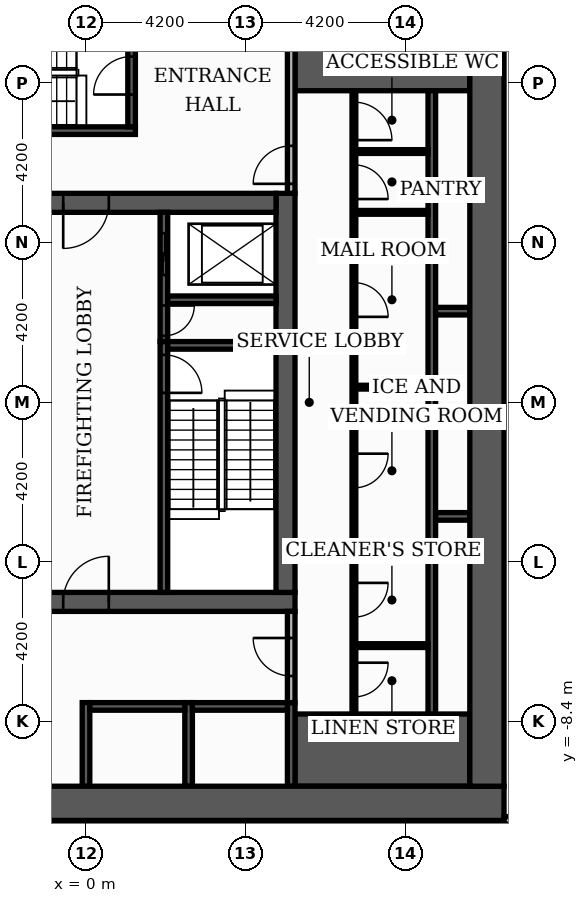
"""IFC4 building model, lengths in metres.
Left out: names, types, materials, properties, quantities, classifications, styles, units other than length and angle.
Written with IfcOpenShell. Run it as: python <this file> out.ifc"""

import sys

from ifc_helpers import new_model, si_unit, direction, frame, frame_2d, origin, place, context, subcontext, project, spatial, rectangle, extrude, element, fill, save


model = new_model("IFC4")
c1 = context("Model", 3, precision=1e-05, world=origin(), true_north=direction((0.0, 1.0)))
c2 = subcontext(c1, "Body", "Model", "MODEL_VIEW")
j1 = project(units=[si_unit("LENGTHUNIT", "METRE"), si_unit("PLANEANGLEUNIT", "RADIAN")], contexts=[c1])
p1 = place(None, origin())
s1 = spatial("IfcSite", under=j1, at=p1, CompositionType="ELEMENT")
p2 = place(p1, origin())
s2 = spatial("IfcBuilding", under=s1, at=p2, CompositionType="ELEMENT")
p3 = place(p2, frame((0.0, 0.0, -4.2)))
s3 = spatial("IfcBuildingStorey", under=s2, at=p3, CompositionType="ELEMENT", Elevation=-4.2)
p4 = place(p3, frame((-5.5, -5.25, 0.0), z_axis=(0.0, 0.0, 1.0), x_axis=(1.0, 0.0, 0.0)))
e1 = element("IfcWall", 1, at=p4, inside=s3, PredefinedType="SHEAR", context=c2, shape_type="SweptSolid", body=[
    extrude(rectangle(XDim=11.0, YDim=0.5, at=frame_2d((5.5, 0.0))), origin(), (0.0, 0.0, 1.0), 3.78),
])
p5 = place(p4, frame((4.9, 0.0, 0.0)))
e2 = element("IfcOpeningElement", 2, at=p5, cuts=e1, PredefinedType="OPENING", context=c2, shape_type="SweptSolid", body=[
    extrude(rectangle(XDim=1.2, YDim=2.1, at=frame_2d((0.6, 1.05))), frame((0.0, 0.26, 0.0), z_axis=(0.0, -1.0, 0.0), x_axis=(1.0, 0.0, 0.0)), (0.0, 0.0, 1.0), 0.52),
])
p6 = place(p3, frame((5.25, -5.0, 0.0), z_axis=(0.0, 0.0, 1.0), x_axis=(0.0, 1.0, 0.0)))
e3 = element("IfcWall", 3, at=p6, inside=s3, PredefinedType="SHEAR", context=c2, shape_type="SweptSolid", body=[
    extrude(rectangle(XDim=10.5, YDim=0.5, at=frame_2d((5.25, 0.0))), origin(), (0.0, 0.0, 1.0), 3.78),
])
p7 = place(p3, frame((-5.0, 5.25, 0.0), z_axis=(0.0, 0.0, 1.0), x_axis=(1.0, 0.0, 0.0)))
e4 = element("IfcWall", 4, at=p7, inside=s3, PredefinedType="SHEAR", context=c2, shape_type="SweptSolid", body=[
    extrude(rectangle(XDim=10.0, YDim=0.5, at=frame_2d((5.0, 0.0))), origin(), (0.0, 0.0, 1.0), 3.78),
])
p8 = place(p7, frame((4.4, 0.0, 0.0)))
e5 = element("IfcOpeningElement", 5, at=p8, cuts=e4, PredefinedType="OPENING", context=c2, shape_type="SweptSolid", body=[
    extrude(rectangle(XDim=1.2, YDim=2.1, at=frame_2d((0.6, 1.05))), frame((0.0, 0.26, 0.0), z_axis=(0.0, -1.0, 0.0), x_axis=(1.0, 0.0, 0.0)), (0.0, 0.0, 1.0), 0.52),
])
for number, where, z_axis, x_axis in (
    (6, (5.5, -9.15, 0.0), (0.0, 0.0, 1.0), (1.0, 0.0, 0.0)),
    (7, (5.5, 9.15, 0.0), (0.0, 0.0, 1.0), (1.0, 0.0, 0.0)),
):
    element("IfcWall", number, at=place(p3, frame(where, z_axis=z_axis, x_axis=x_axis)), inside=s3, PredefinedType="SHEAR", context=c2, shape_type="SweptSolid", body=[
        extrude(rectangle(XDim=4.6, YDim=1.9, at=frame_2d((2.3, 0.0))), origin(), (0.0, 0.0, 1.0), 3.78),
    ])
p9 = place(p3, frame((2.05, -5.0, 0.0), z_axis=(0.0, 0.0, 1.0), x_axis=(0.0, 1.0, 0.0)))
e8 = element("IfcWall", 8, at=p9, inside=s3, PredefinedType="SHEAR", context=c2, shape_type="SweptSolid", body=[
    extrude(rectangle(XDim=6.6, YDim=0.2, at=frame_2d((3.3, 0.0))), origin(), (0.0, 0.0, 1.0), 3.78),
])
p10 = place(p9, frame((5.25, 0.0, 0.0)))
e9 = element("IfcOpeningElement", 9, at=p10, cuts=e8, PredefinedType="OPENING", context=c2, shape_type="SweptSolid", body=[
    extrude(rectangle(XDim=1.0, YDim=2.1, at=frame_2d((0.5, 1.05))), frame((0.0, 0.11, 0.0), z_axis=(0.0, -1.0, 0.0), x_axis=(1.0, 0.0, 0.0)), (0.0, 0.0, 1.0), 0.22),
])
p11 = place(p3, frame((2.15, 1.5, 0.0), z_axis=(0.0, 0.0, 1.0), x_axis=(1.0, 0.0, 0.0)))
e10 = element("IfcWall", 10, at=p11, inside=s3, PredefinedType="SHEAR", context=c2, shape_type="SweptSolid", body=[
    extrude(rectangle(XDim=2.85, YDim=0.2, at=frame_2d((1.425, 0.0))), origin(), (0.0, 0.0, 1.0), 3.78),
])
p12 = place(p3, frame((-5.5, 7.15, 0.0), z_axis=(0.0, 0.0, 1.0), x_axis=(1.0, 0.0, 0.0)))
e11 = element("IfcWall", 11, at=p12, inside=s3, PredefinedType="SHEAR", context=c2, shape_type="SweptSolid", body=[
    extrude(rectangle(XDim=6.8, YDim=0.2, at=frame_2d((3.4, 0.0))), origin(), (0.0, 0.0, 1.0), 3.78),
])
p13 = place(p3, frame((1.2, 7.25, 0.0), z_axis=(0.0, 0.0, 1.0), x_axis=(0.0, 1.0, 0.0)))
e12 = element("IfcWall", 12, at=p13, inside=s3, PredefinedType="SHEAR", context=c2, shape_type="SweptSolid", body=[
    extrude(rectangle(XDim=2.85, YDim=0.2, at=frame_2d((1.425, 0.0))), origin(), (0.0, 0.0, 1.0), 3.78),
])
p14 = place(p13, frame((0.85, 0.0, 0.0)))
e13 = element("IfcOpeningElement", 13, at=p14, cuts=e12, PredefinedType="OPENING", context=c2, shape_type="SweptSolid", body=[
    extrude(rectangle(XDim=1.0, YDim=2.1, at=frame_2d((0.5, 1.05))), frame((0.0, 0.11, 0.0), z_axis=(0.0, -1.0, 0.0), x_axis=(1.0, 0.0, 0.0)), (0.0, 0.0, 1.0), 0.22),
])
for number, where, z_axis, x_axis in (
    (14, (0.0, -10.1, 0.0), (0.0, 0.0, 1.0), (0.0, 1.0, 0.0)),
    (15, (2.7, -10.1, 0.0), (0.0, 0.0, 1.0), (0.0, 1.0, 0.0)),
    (16, (5.4, -10.1, 0.0), (0.0, 0.0, 1.0), (0.0, 1.0, 0.0)),
):
    element("IfcWall", number, at=place(p3, frame(where, z_axis=z_axis, x_axis=x_axis)), inside=s3, PredefinedType="SHEAR", context=c2, shape_type="SweptSolid", body=[
        extrude(rectangle(XDim=2.2, YDim=0.2, at=frame_2d((1.1, 0.0))), origin(), (0.0, 0.0, 1.0), 3.78),
    ])
p15 = place(p3, frame((9.1, -8.2, 0.0), z_axis=(0.0, 0.0, 1.0), x_axis=(0.0, 1.0, 0.0)))
e17 = element("IfcWall", 17, at=p15, inside=s3, PredefinedType="SHEAR", context=c2, shape_type="SweptSolid", body=[
    extrude(rectangle(XDim=16.4, YDim=0.2, at=frame_2d((8.2, 0.0))), origin(), (0.0, 0.0, 1.0), 3.78),
])
for number, where, z_axis, x_axis in (
    (18, (0.1, -8.0, 0.0), (0.0, 0.0, 1.0), (1.0, 0.0, 0.0)),
    (19, (2.8, -8.0, 0.0), (0.0, 0.0, 1.0), (1.0, 0.0, 0.0)),
):
    element("IfcWall", number, at=place(p3, frame(where, z_axis=z_axis, x_axis=x_axis)), inside=s3, PredefinedType="SHEAR", context=c2, shape_type="SweptSolid", body=[
        extrude(rectangle(XDim=2.5, YDim=0.2, at=frame_2d((1.25, 0.0))), origin(), (0.0, 0.0, 1.0), 3.78),
    ])
p16 = place(p3, frame((9.2, -3.0, 0.0), z_axis=(0.0, 0.0, 1.0), x_axis=(1.0, 0.0, 0.0)))
e20 = element("IfcWall", 20, at=p16, inside=s3, PredefinedType="SHEAR", context=c2, shape_type="SweptSolid", body=[
    extrude(rectangle(XDim=0.9, YDim=0.2, at=frame_2d((0.45, 0.0))), origin(), (0.0, 0.0, 1.0), 3.78),
])
p17 = place(p3, frame((2.05, 1.6, 0.0), z_axis=(0.0, 0.0, 1.0), x_axis=(0.0, 1.0, 0.0)))
e21 = element("IfcWall", 21, at=p17, inside=s3, PredefinedType="SHEAR", context=c2, shape_type="SweptSolid", body=[
    extrude(rectangle(XDim=3.4, YDim=0.2, at=frame_2d((1.7, 0.0))), origin(), (0.0, 0.0, 1.0), 3.78),
])
p18 = place(p17, frame((1.75, 0.0, 0.0)))
e22 = element("IfcOpeningElement", 22, at=p18, cuts=e21, PredefinedType="OPENING", context=c2, shape_type="SweptSolid", body=[
    extrude(rectangle(XDim=1.1, YDim=2.1, at=frame_2d((0.55, 1.05))), frame((0.0, 0.11, 0.0), z_axis=(0.0, -1.0, 0.0), x_axis=(1.0, 0.0, 0.0)), (0.0, 0.0, 1.0), 0.22),
])
p19 = place(p17, frame((0.15, 0.0, 0.0)))
e23 = element("IfcOpeningElement", 23, at=p19, cuts=e21, PredefinedType="OPENING", context=c2, shape_type="SweptSolid", body=[
    extrude(rectangle(XDim=0.8, YDim=2.1, at=frame_2d((0.4, 1.05))), frame((0.0, 0.11, 0.0), z_axis=(0.0, -1.0, 0.0), x_axis=(1.0, 0.0, 0.0)), (0.0, 0.0, 1.0), 0.22),
])
p20 = place(p3, frame((9.2, 2.4, 0.0), z_axis=(0.0, 0.0, 1.0), x_axis=(1.0, 0.0, 0.0)))
e24 = element("IfcWall", 24, at=p20, inside=s3, PredefinedType="SHEAR", context=c2, shape_type="SweptSolid", body=[
    extrude(rectangle(XDim=0.9, YDim=0.2, at=frame_2d((0.45, 0.0))), origin(), (0.0, 0.0, 1.0), 3.78),
])
p21 = place(p3, frame((2.15, 2.7, 0.0), z_axis=(0.0, 0.0, 1.0), x_axis=(1.0, 0.0, 0.0)))
e25 = element("IfcWall", 25, at=p21, inside=s3, PredefinedType="SHEAR", context=c2, shape_type="SweptSolid", body=[
    extrude(rectangle(XDim=2.85, YDim=0.2, at=frame_2d((1.425, 0.0))), origin(), (0.0, 0.0, 1.0), 3.78),
])
p22 = place(p3, frame((-11.0, -10.55, 0.0), z_axis=(0.0, 0.0, 1.0), x_axis=(1.0, 0.0, 0.0)))
e26 = element("IfcWall", 26, at=p22, inside=s3, PredefinedType="SHEAR", context=c2, shape_type="SweptSolid", body=[
    extrude(rectangle(XDim=22.0, YDim=0.9, at=frame_2d((11.0, 0.0))), origin(), (0.0, 0.0, 1.0), 3.78),
])
p23 = place(p22, frame((7.4, 0.0, 0.0)))
e27 = element("IfcOpeningElement", 27, at=p23, cuts=e26, PredefinedType="OPENING", context=c2, shape_type="SweptSolid", body=[
    extrude(rectangle(XDim=1.8, YDim=2.2, at=frame_2d((0.9, 1.1))), frame((0.0, 0.46, 0.0), z_axis=(0.0, -1.0, 0.0), x_axis=(1.0, 0.0, 0.0)), (0.0, 0.0, 1.0), 0.92),
])
p24 = place(p3, frame((10.55, -10.1, 0.0), z_axis=(0.0, 0.0, 1.0), x_axis=(0.0, 1.0, 0.0)))
e28 = element("IfcWall", 28, at=p24, inside=s3, PredefinedType="SHEAR", context=c2, shape_type="SweptSolid", body=[
    extrude(rectangle(XDim=20.2, YDim=0.9, at=frame_2d((10.1, 0.0))), origin(), (0.0, 0.0, 1.0), 3.78),
])
p25 = place(p3, frame((7.05, -8.2, 0.0), z_axis=(0.0, 0.0, 1.0), x_axis=(0.0, 1.0, 0.0)))
e29 = element("IfcWall", 29, at=p25, inside=s3, PredefinedType="PARTITIONING", context=c2, shape_type="SweptSolid", body=[
    extrude(rectangle(XDim=16.4, YDim=0.1, at=frame_2d((8.2, 0.0))), origin(), (0.0, 0.0, 1.0), 3.78),
])
p26 = place(p25, frame((0.45, 0.0, 0.0)))
e30 = element("IfcOpeningElement", 30, at=p26, cuts=e29, PredefinedType="OPENING", context=c2, shape_type="SweptSolid", body=[
    extrude(rectangle(XDim=0.9, YDim=2.1, at=frame_2d((0.45, 1.05))), frame((0.0, 0.06, 0.0), z_axis=(0.0, -1.0, 0.0), x_axis=(1.0, 0.0, 0.0)), (0.0, 0.0, 1.0), 0.12),
])
p27 = place(p25, frame((2.55, 0.0, 0.0)))
e31 = element("IfcOpeningElement", 31, at=p27, cuts=e29, PredefinedType="OPENING", context=c2, shape_type="SweptSolid", body=[
    extrude(rectangle(XDim=0.9, YDim=2.1, at=frame_2d((0.45, 1.05))), frame((0.0, 0.06, 0.0), z_axis=(0.0, -1.0, 0.0), x_axis=(1.0, 0.0, 0.0)), (0.0, 0.0, 1.0), 0.12),
])
p28 = place(p25, frame((5.95, 0.0, 0.0)))
e32 = element("IfcOpeningElement", 32, at=p28, cuts=e29, PredefinedType="OPENING", context=c2, shape_type="SweptSolid", body=[
    extrude(rectangle(XDim=0.9, YDim=2.1, at=frame_2d((0.45, 1.05))), frame((0.0, 0.06, 0.0), z_axis=(0.0, -1.0, 0.0), x_axis=(1.0, 0.0, 0.0)), (0.0, 0.0, 1.0), 0.12),
])
p29 = place(p25, frame((10.45, 0.0, 0.0)))
e33 = element("IfcOpeningElement", 33, at=p29, cuts=e29, PredefinedType="OPENING", context=c2, shape_type="SweptSolid", body=[
    extrude(rectangle(XDim=0.9, YDim=2.1, at=frame_2d((0.45, 1.05))), frame((0.0, 0.06, 0.0), z_axis=(0.0, -1.0, 0.0), x_axis=(1.0, 0.0, 0.0)), (0.0, 0.0, 1.0), 0.12),
])
p30 = place(p25, frame((13.55, 0.0, 0.0)))
e34 = element("IfcOpeningElement", 34, at=p30, cuts=e29, PredefinedType="OPENING", context=c2, shape_type="SweptSolid", body=[
    extrude(rectangle(XDim=0.9, YDim=2.1, at=frame_2d((0.45, 1.05))), frame((0.0, 0.06, 0.0), z_axis=(0.0, -1.0, 0.0), x_axis=(1.0, 0.0, 0.0)), (0.0, 0.0, 1.0), 0.12),
])
p31 = place(p25, frame((15.1, 0.0, 0.0)))
e35 = element("IfcOpeningElement", 35, at=p31, cuts=e29, PredefinedType="OPENING", context=c2, shape_type="SweptSolid", body=[
    extrude(rectangle(XDim=1.0, YDim=2.1, at=frame_2d((0.5, 1.05))), frame((0.0, 0.06, 0.0), z_axis=(0.0, -1.0, 0.0), x_axis=(1.0, 0.0, 0.0)), (0.0, 0.0, 1.0), 0.12),
])
p32 = place(p3, frame((5.4, -7.9, 0.0), z_axis=(0.0, 0.0, 1.0), x_axis=(0.0, 1.0, 0.0)))
e36 = element("IfcWall", 36, at=p32, inside=s3, PredefinedType="PARTITIONING", context=c2, shape_type="SweptSolid", body=[
    extrude(rectangle(XDim=2.4, YDim=0.2, at=frame_2d((1.2, 0.0))), origin(), (0.0, 0.0, 1.0), 3.78),
])
p33 = place(p32, frame((0.7, 0.0, 0.0)))
e37 = element("IfcOpeningElement", 37, at=p33, cuts=e36, PredefinedType="OPENING", context=c2, shape_type="SweptSolid", body=[
    extrude(rectangle(XDim=1.0, YDim=2.1, at=frame_2d((0.5, 1.05))), frame((0.0, 0.11, 0.0), z_axis=(0.0, -1.0, 0.0), x_axis=(1.0, 0.0, 0.0)), (0.0, 0.0, 1.0), 0.22),
])
for number, where, z_axis, x_axis in (
    (38, (7.1, -6.4, 0.0), (0.0, 0.0, 1.0), (1.0, 0.0, 0.0)),
    (39, (7.1, -4.0, 0.0), (0.0, 0.0, 1.0), (1.0, 0.0, 0.0)),
    (40, (7.1, 0.4, 0.0), (0.0, 0.0, 1.0), (1.0, 0.0, 0.0)),
    (41, (7.1, 5.0, 0.0), (0.0, 0.0, 1.0), (1.0, 0.0, 0.0)),
):
    element("IfcWall", number, at=place(p3, frame(where, z_axis=z_axis, x_axis=x_axis)), inside=s3, PredefinedType="PARTITIONING", context=c2, shape_type="SweptSolid", body=[
        extrude(rectangle(XDim=1.9, YDim=0.1, at=frame_2d((0.95, 0.0))), origin(), (0.0, 0.0, 1.0), 3.78),
    ])
p34 = place(p3, frame((5.4, 5.5, 0.0), z_axis=(0.0, 0.0, 1.0), x_axis=(0.0, 1.0, 0.0)))
e42 = element("IfcWall", 42, at=p34, inside=s3, PredefinedType="PARTITIONING", context=c2, shape_type="SweptSolid", body=[
    extrude(rectangle(XDim=4.6, YDim=0.2, at=frame_2d((2.3, 0.0))), origin(), (0.0, 0.0, 1.0), 3.78),
])
p35 = place(p34, frame((0.25, 0.0, 0.0)))
e43 = element("IfcOpeningElement", 43, at=p35, cuts=e42, PredefinedType="OPENING", context=c2, shape_type="SweptSolid", body=[
    extrude(rectangle(XDim=1.0, YDim=2.1, at=frame_2d((0.5, 1.05))), frame((0.0, 0.11, 0.0), z_axis=(0.0, -1.0, 0.0), x_axis=(1.0, 0.0, 0.0)), (0.0, 0.0, 1.0), 0.22),
])
p36 = place(p3, frame((7.1, 6.6, 0.0), z_axis=(0.0, 0.0, 1.0), x_axis=(1.0, 0.0, 0.0)))
e44 = element("IfcWall", 44, at=p36, inside=s3, PredefinedType="PARTITIONING", context=c2, shape_type="SweptSolid", body=[
    extrude(rectangle(XDim=1.9, YDim=0.1, at=frame_2d((0.95, 0.0))), origin(), (0.0, 0.0, 1.0), 3.78),
])
p37 = place(p3, frame((11.0, -11.0, 0.0), z_axis=(0.0, 0.0, 1.0), x_axis=(1.0, 0.0, 0.0)))
e45 = element("IfcWall", 45, at=p37, inside=s3, PredefinedType="PARTITIONING", context=c2, shape_type="SweptSolid", body=[
    extrude(rectangle(XDim=14.3, YDim=0.2, at=frame_2d((7.15, 0.0))), origin(), (0.0, 0.0, 1.0), 3.78),
])
p38 = place(p37, frame((1.1, 0.0, 0.0)))
e46 = element("IfcOpeningElement", 46, at=p38, cuts=e45, PredefinedType="OPENING", context=c2, shape_type="SweptSolid", body=[
    extrude(rectangle(XDim=1.2, YDim=2.2, at=frame_2d((0.6, 1.1))), frame((0.0, 0.11, 0.0), z_axis=(0.0, -1.0, 0.0), x_axis=(1.0, 0.0, 0.0)), (0.0, 0.0, 1.0), 0.22),
])
p39 = place(p18, origin())
e47 = element("IfcDoor", 47, at=p39, inside=s3, OperationType="SLIDING_TO_LEFT", PredefinedType="DOOR", context=c2, shape_type="SweptSolid", body=[
    extrude(rectangle(XDim=1.1, YDim=2.1, at=frame_2d((0.55, 1.05))), frame((0.0, 0.025, 0.0), z_axis=(0.0, -1.0, 0.0), x_axis=(1.0, 0.0, 0.0)), (0.0, 0.0, 1.0), 0.05),
])
fill(e22, e47)
p40 = place(p10, frame((1.0, 0.0, 0.0), z_axis=(0.0, 0.0, 1.0), x_axis=(-1.0, 0.0, 0.0)))
e48 = element("IfcDoor", 48, at=p40, inside=s3, OperationType="SINGLE_SWING_LEFT", PredefinedType="DOOR", context=c2, shape_type="SweptSolid", body=[
    extrude(rectangle(XDim=1.0, YDim=2.1, at=frame_2d((0.5, 1.05))), frame((0.0, 0.025, 0.0), z_axis=(0.0, -1.0, 0.0), x_axis=(1.0, 0.0, 0.0)), (0.0, 0.0, 1.0), 0.05),
])
fill(e9, e48)
p41 = place(p19, frame((0.8, 0.0, 0.0), z_axis=(0.0, 0.0, 1.0), x_axis=(-1.0, 0.0, 0.0)))
e49 = element("IfcDoor", 49, at=p41, inside=s3, OperationType="SINGLE_SWING_RIGHT", PredefinedType="DOOR", context=c2, shape_type="SweptSolid", body=[
    extrude(rectangle(XDim=0.8, YDim=2.1, at=frame_2d((0.4, 1.05))), frame((0.0, 0.025, 0.0), z_axis=(0.0, -1.0, 0.0), x_axis=(1.0, 0.0, 0.0)), (0.0, 0.0, 1.0), 0.05),
])
fill(e23, e49)
p42 = place(p8, frame((1.2, 0.0, 0.0), z_axis=(0.0, 0.0, 1.0), x_axis=(-1.0, 0.0, 0.0)))
e50 = element("IfcDoor", 50, at=p42, inside=s3, OperationType="SINGLE_SWING_LEFT", PredefinedType="DOOR", context=c2, shape_type="SweptSolid", body=[
    extrude(rectangle(XDim=1.2, YDim=2.1, at=frame_2d((0.6, 1.05))), frame((0.0, 0.025, 0.0), z_axis=(0.0, -1.0, 0.0), x_axis=(1.0, 0.0, 0.0)), (0.0, 0.0, 1.0), 0.05),
])
fill(e5, e50)
p43 = place(p5, origin())
e51 = element("IfcDoor", 51, at=p43, inside=s3, OperationType="SINGLE_SWING_RIGHT", PredefinedType="DOOR", context=c2, shape_type="SweptSolid", body=[
    extrude(rectangle(XDim=1.2, YDim=2.1, at=frame_2d((0.6, 1.05))), frame((0.0, 0.025, 0.0), z_axis=(0.0, -1.0, 0.0), x_axis=(1.0, 0.0, 0.0)), (0.0, 0.0, 1.0), 0.05),
])
fill(e2, e51)
p44 = place(p14, origin())
e52 = element("IfcDoor", 52, at=p44, inside=s3, OperationType="SINGLE_SWING_LEFT", PredefinedType="DOOR", context=c2, shape_type="SweptSolid", body=[
    extrude(rectangle(XDim=1.0, YDim=2.1, at=frame_2d((0.5, 1.05))), frame((0.0, 0.025, 0.0), z_axis=(0.0, -1.0, 0.0), x_axis=(1.0, 0.0, 0.0)), (0.0, 0.0, 1.0), 0.05),
])
fill(e13, e52)
p45 = place(p35, origin())
e53 = element("IfcDoor", 53, at=p45, inside=s3, OperationType="SINGLE_SWING_LEFT", PredefinedType="DOOR", context=c2, shape_type="SweptSolid", body=[
    extrude(rectangle(XDim=1.0, YDim=2.1, at=frame_2d((0.5, 1.05))), frame((0.0, 0.025, 0.0), z_axis=(0.0, -1.0, 0.0), x_axis=(1.0, 0.0, 0.0)), (0.0, 0.0, 1.0), 0.05),
])
fill(e43, e53)
p46 = place(p33, origin())
e54 = element("IfcDoor", 54, at=p46, inside=s3, OperationType="SINGLE_SWING_RIGHT", PredefinedType="DOOR", context=c2, shape_type="SweptSolid", body=[
    extrude(rectangle(XDim=1.0, YDim=2.1, at=frame_2d((0.5, 1.05))), frame((0.0, 0.025, 0.0), z_axis=(0.0, -1.0, 0.0), x_axis=(1.0, 0.0, 0.0)), (0.0, 0.0, 1.0), 0.05),
])
fill(e37, e54)
p47 = place(p26, frame((0.9, 0.0, 0.0), z_axis=(0.0, 0.0, 1.0), x_axis=(-1.0, 0.0, 0.0)))
e55 = element("IfcDoor", 55, at=p47, inside=s3, OperationType="SINGLE_SWING_RIGHT", PredefinedType="DOOR", context=c2, shape_type="SweptSolid", body=[
    extrude(rectangle(XDim=0.9, YDim=2.1, at=frame_2d((0.45, 1.05))), frame((0.0, 0.025, 0.0), z_axis=(0.0, -1.0, 0.0), x_axis=(1.0, 0.0, 0.0)), (0.0, 0.0, 1.0), 0.05),
])
fill(e30, e55)
p48 = place(p27, frame((0.9, 0.0, 0.0), z_axis=(0.0, 0.0, 1.0), x_axis=(-1.0, 0.0, 0.0)))
e56 = element("IfcDoor", 56, at=p48, inside=s3, OperationType="SINGLE_SWING_RIGHT", PredefinedType="DOOR", context=c2, shape_type="SweptSolid", body=[
    extrude(rectangle(XDim=0.9, YDim=2.1, at=frame_2d((0.45, 1.05))), frame((0.0, 0.025, 0.0), z_axis=(0.0, -1.0, 0.0), x_axis=(1.0, 0.0, 0.0)), (0.0, 0.0, 1.0), 0.05),
])
fill(e31, e56)
p49 = place(p28, frame((0.9, 0.0, 0.0), z_axis=(0.0, 0.0, 1.0), x_axis=(-1.0, 0.0, 0.0)))
e57 = element("IfcDoor", 57, at=p49, inside=s3, OperationType="SINGLE_SWING_RIGHT", PredefinedType="DOOR", context=c2, shape_type="SweptSolid", body=[
    extrude(rectangle(XDim=0.9, YDim=2.1, at=frame_2d((0.45, 1.05))), frame((0.0, 0.025, 0.0), z_axis=(0.0, -1.0, 0.0), x_axis=(1.0, 0.0, 0.0)), (0.0, 0.0, 1.0), 0.05),
])
fill(e32, e57)
p50 = place(p29, frame((0.9, 0.0, 0.0), z_axis=(0.0, 0.0, 1.0), x_axis=(-1.0, 0.0, 0.0)))
e58 = element("IfcDoor", 58, at=p50, inside=s3, OperationType="SINGLE_SWING_LEFT", PredefinedType="DOOR", context=c2, shape_type="SweptSolid", body=[
    extrude(rectangle(XDim=0.9, YDim=2.1, at=frame_2d((0.45, 1.05))), frame((0.0, 0.025, 0.0), z_axis=(0.0, -1.0, 0.0), x_axis=(1.0, 0.0, 0.0)), (0.0, 0.0, 1.0), 0.05),
])
fill(e33, e58)
p51 = place(p30, frame((0.9, 0.0, 0.0), z_axis=(0.0, 0.0, 1.0), x_axis=(-1.0, 0.0, 0.0)))
e59 = element("IfcDoor", 59, at=p51, inside=s3, OperationType="SINGLE_SWING_LEFT", PredefinedType="DOOR", context=c2, shape_type="SweptSolid", body=[
    extrude(rectangle(XDim=0.9, YDim=2.1, at=frame_2d((0.45, 1.05))), frame((0.0, 0.025, 0.0), z_axis=(0.0, -1.0, 0.0), x_axis=(1.0, 0.0, 0.0)), (0.0, 0.0, 1.0), 0.05),
])
fill(e34, e59)
p52 = place(p31, frame((1.0, 0.0, 0.0), z_axis=(0.0, 0.0, 1.0), x_axis=(-1.0, 0.0, 0.0)))
e60 = element("IfcDoor", 60, at=p52, inside=s3, OperationType="SINGLE_SWING_LEFT", PredefinedType="DOOR", context=c2, shape_type="SweptSolid", body=[
    extrude(rectangle(XDim=1.0, YDim=2.1, at=frame_2d((0.5, 1.05))), frame((0.0, 0.025, 0.0), z_axis=(0.0, -1.0, 0.0), x_axis=(1.0, 0.0, 0.0)), (0.0, 0.0, 1.0), 0.05),
])
fill(e35, e60)
save(model, sys.argv[1])
